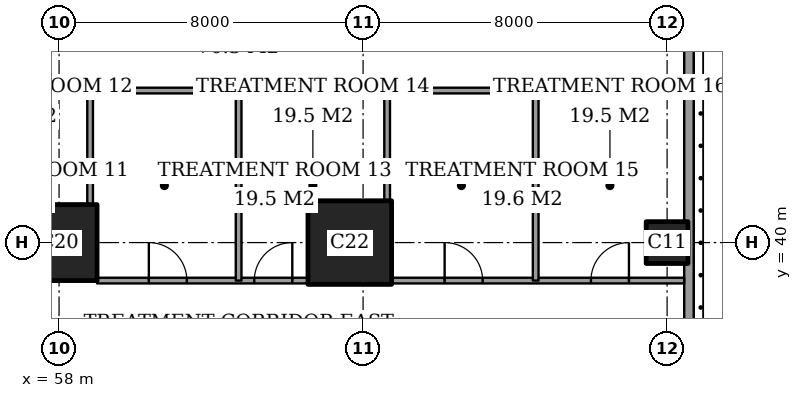
"""IFC4 building model, lengths in metres.
Left out: names, types, materials, properties, quantities, classifications, styles, units other than length and angle.
Written with IfcOpenShell. Run it as: python <this file> out.ifc"""

import sys

from ifc_helpers import new_model, si_unit, direction, frame, frame_2d, origin, origin_2d, place, context, subcontext, project, spatial, rectangle, extrude, element, fill, save


model = new_model("IFC4")
c1 = context("Model", 3, precision=1e-05, world=origin(), true_north=direction((0.0, 1.0)))
c2 = subcontext(c1, "Body", "Model", "MODEL_VIEW")
j1 = project(units=[si_unit("LENGTHUNIT", "METRE"), si_unit("PLANEANGLEUNIT", "RADIAN")], contexts=[c1])
p1 = place(None, origin())
s1 = spatial("IfcSite", under=j1, at=p1, CompositionType="ELEMENT")
p2 = place(p1, origin())
s2 = spatial("IfcBuilding", under=s1, at=p2, CompositionType="ELEMENT")
p3 = place(p2, frame((0.0, 0.0, 11.0)))
s3 = spatial("IfcBuildingStorey", under=s2, at=p3, CompositionType="ELEMENT", Elevation=11.0)
p4 = place(p3, frame((58.0, 40.0, 0.0), z_axis=(0.0, 0.0, 1.0), x_axis=(1.0, 0.0, 0.0)))
e1 = element("IfcColumn", 1, at=p4, inside=s3, PredefinedType="COLUMN", context=c2, shape_type="SweptSolid", body=[
    extrude(rectangle(XDim=2.0, YDim=2.0, at=origin_2d()), origin(), (0.0, 0.0, 1.0), 5.0),
])
p5 = place(p3, frame((65.65, 40.0, 0.0), z_axis=(0.0, 0.0, 1.0), x_axis=(1.0, 0.0, 0.0)))
e2 = element("IfcColumn", 2, at=p5, inside=s3, PredefinedType="COLUMN", context=c2, shape_type="SweptSolid", body=[
    extrude(rectangle(XDim=2.2, YDim=2.2, at=origin_2d()), origin(), (0.0, 0.0, 1.0), 5.0),
])
p6 = place(p3, frame((74.0, 40.0, 0.0), z_axis=(0.0, 0.0, 1.0), x_axis=(1.0, 0.0, 0.0)))
e3 = element("IfcColumn", 3, at=p6, inside=s3, PredefinedType="COLUMN", context=c2, shape_type="SweptSolid", body=[
    extrude(rectangle(XDim=1.1, YDim=1.1, at=origin_2d()), origin(), (0.0, 0.0, 1.0), 5.0),
])
p7 = place(p3, frame((74.575, -8.575, 0.0), z_axis=(0.0, 0.0, 1.0), x_axis=(0.0, 1.0, 0.0)))
e4 = element("IfcWall", 4, at=p7, inside=s3, PredefinedType="SOLIDWALL", context=c2, shape_type="SweptSolid", body=[
    extrude(rectangle(XDim=65.15, YDim=0.25, at=frame_2d((32.575, 0.0))), origin(), (0.0, 0.0, 1.0), 5.0),
])
p8 = place(p7, frame((12.075, 0.0, 0.0)))
e5 = element("IfcOpeningElement", 5, at=p8, cuts=e4, PredefinedType="OPENING", context=c2, shape_type="SweptSolid", body=[
    extrude(rectangle(XDim=1.0, YDim=2.4, at=frame_2d((0.5, 1.2))), frame((0.0, 0.135, 0.0), z_axis=(0.0, -1.0, 0.0), x_axis=(1.0, 0.0, 0.0)), (0.0, 0.0, 1.0), 0.27),
])
p9 = place(p7, frame((28.075, 0.0, 0.0)))
e6 = element("IfcOpeningElement", 6, at=p9, cuts=e4, PredefinedType="OPENING", context=c2, shape_type="SweptSolid", body=[
    extrude(rectangle(XDim=1.0, YDim=2.4, at=frame_2d((0.5, 1.2))), frame((0.0, 0.135, 0.0), z_axis=(0.0, -1.0, 0.0), x_axis=(1.0, 0.0, 0.0)), (0.0, 0.0, 1.0), 0.27),
])
p10 = place(p7, frame((41.275, 0.0, 0.0)))
e7 = element("IfcOpeningElement", 7, at=p10, cuts=e4, PredefinedType="OPENING", context=c2, shape_type="SweptSolid", body=[
    extrude(rectangle(XDim=1.0, YDim=2.4, at=frame_2d((0.5, 1.2))), frame((0.0, 0.135, 0.0), z_axis=(0.0, -1.0, 0.0), x_axis=(1.0, 0.0, 0.0)), (0.0, 0.0, 1.0), 0.27),
])
p11 = place(p3, frame((59.0, 39.0, 0.0), z_axis=(0.0, 0.0, 1.0), x_axis=(1.0, 0.0, 0.0)))
e8 = element("IfcWall", 8, at=p11, inside=s3, PredefinedType="PARTITIONING", context=c2, shape_type="SweptSolid", body=[
    extrude(rectangle(XDim=5.55, YDim=0.15, at=frame_2d((2.775, 0.0))), origin(), (0.0, 0.0, 1.0), 4.7),
])
p12 = place(p11, frame((1.363, 0.0, 0.0)))
e9 = element("IfcOpeningElement", 9, at=p12, cuts=e8, PredefinedType="OPENING", context=c2, shape_type="SweptSolid", body=[
    extrude(rectangle(XDim=1.0, YDim=2.1, at=frame_2d((0.5, 1.05))), frame((0.0, 0.085, 0.0), z_axis=(0.0, -1.0, 0.0), x_axis=(1.0, 0.0, 0.0)), (0.0, 0.0, 1.0), 0.17),
])
p13 = place(p11, frame((4.137, 0.0, 0.0)))
e10 = element("IfcOpeningElement", 10, at=p13, cuts=e8, PredefinedType="OPENING", context=c2, shape_type="SweptSolid", body=[
    extrude(rectangle(XDim=1.0, YDim=2.1, at=frame_2d((0.5, 1.05))), frame((0.0, 0.085, 0.0), z_axis=(0.0, -1.0, 0.0), x_axis=(1.0, 0.0, 0.0)), (0.0, 0.0, 1.0), 0.17),
])
p14 = place(p3, frame((66.75, 39.0, 0.0), z_axis=(0.0, 0.0, 1.0), x_axis=(1.0, 0.0, 0.0)))
e11 = element("IfcWall", 11, at=p14, inside=s3, PredefinedType="PARTITIONING", context=c2, shape_type="SweptSolid", body=[
    extrude(rectangle(XDim=7.7, YDim=0.15, at=frame_2d((3.85, 0.0))), origin(), (0.0, 0.0, 1.0), 4.7),
])
p15 = place(p14, frame((1.396, 0.0, 0.0)))
e12 = element("IfcOpeningElement", 12, at=p15, cuts=e11, PredefinedType="OPENING", context=c2, shape_type="SweptSolid", body=[
    extrude(rectangle(XDim=1.0, YDim=2.1, at=frame_2d((0.5, 1.05))), frame((0.0, 0.085, 0.0), z_axis=(0.0, -1.0, 0.0), x_axis=(1.0, 0.0, 0.0)), (0.0, 0.0, 1.0), 0.17),
])
p16 = place(p14, frame((5.246, 0.0, 0.0)))
e13 = element("IfcOpeningElement", 13, at=p16, cuts=e11, PredefinedType="OPENING", context=c2, shape_type="SweptSolid", body=[
    extrude(rectangle(XDim=1.0, YDim=2.1, at=frame_2d((0.5, 1.05))), frame((0.0, 0.085, 0.0), z_axis=(0.0, -1.0, 0.0), x_axis=(1.0, 0.0, 0.0)), (0.0, 0.0, 1.0), 0.17),
])
p17 = place(p3, frame((51.0, 44.0, 0.0), z_axis=(0.0, 0.0, 1.0), x_axis=(1.0, 0.0, 0.0)))
e14 = element("IfcWall", 14, at=p17, inside=s3, PredefinedType="PARTITIONING", context=c2, shape_type="SweptSolid", body=[
    extrude(rectangle(XDim=23.45, YDim=0.15, at=frame_2d((11.725, 0.0))), origin(), (0.0, 0.0, 1.0), 4.7),
])
p18 = place(p3, frame((58.817, 41.0, 0.0), z_axis=(0.0, 0.0, 1.0), x_axis=(0.0, 1.0, 0.0)))
e15 = element("IfcWall", 15, at=p18, inside=s3, PredefinedType="PARTITIONING", context=c2, shape_type="SweptSolid", body=[
    extrude(rectangle(XDim=3.0, YDim=0.15, at=frame_2d((1.5, 0.0))), origin(), (0.0, 0.0, 1.0), 4.7),
])
p19 = place(p3, frame((62.725, 39.0, 0.0), z_axis=(0.0, 0.0, 1.0), x_axis=(0.0, 1.0, 0.0)))
e16 = element("IfcWall", 16, at=p19, inside=s3, PredefinedType="PARTITIONING", context=c2, shape_type="SweptSolid", body=[
    extrude(rectangle(XDim=5.0, YDim=0.15, at=frame_2d((2.5, 0.0))), origin(), (0.0, 0.0, 1.0), 4.7),
])
p20 = place(p3, frame((66.633, 41.1, 0.0), z_axis=(0.0, 0.0, 1.0), x_axis=(0.0, 1.0, 0.0)))
e17 = element("IfcWall", 17, at=p20, inside=s3, PredefinedType="PARTITIONING", context=c2, shape_type="SweptSolid", body=[
    extrude(rectangle(XDim=2.9, YDim=0.15, at=frame_2d((1.45, 0.0))), origin(), (0.0, 0.0, 1.0), 4.7),
])
p21 = place(p3, frame((70.542, 39.0, 0.0), z_axis=(0.0, 0.0, 1.0), x_axis=(0.0, 1.0, 0.0)))
e18 = element("IfcWall", 18, at=p21, inside=s3, PredefinedType="PARTITIONING", context=c2, shape_type="SweptSolid", body=[
    extrude(rectangle(XDim=5.0, YDim=0.15, at=frame_2d((2.5, 0.0))), origin(), (0.0, 0.0, 1.0), 4.7),
])
p22 = place(p12, origin())
e19 = element("IfcDoor", 19, at=p22, inside=s3, OperationType="SINGLE_SWING_RIGHT", PredefinedType="DOOR", context=c2, shape_type="SweptSolid", body=[
    extrude(rectangle(XDim=1.0, YDim=2.1, at=frame_2d((0.5, 1.05))), frame((0.0, 0.025, 0.0), z_axis=(0.0, -1.0, 0.0), x_axis=(1.0, 0.0, 0.0)), (0.0, 0.0, 1.0), 0.05),
])
fill(e9, e19)
p23 = place(p13, origin())
e20 = element("IfcDoor", 20, at=p23, inside=s3, OperationType="SINGLE_SWING_LEFT", PredefinedType="DOOR", context=c2, shape_type="SweptSolid", body=[
    extrude(rectangle(XDim=1.0, YDim=2.1, at=frame_2d((0.5, 1.05))), frame((0.0, 0.025, 0.0), z_axis=(0.0, -1.0, 0.0), x_axis=(1.0, 0.0, 0.0)), (0.0, 0.0, 1.0), 0.05),
])
fill(e10, e20)
p24 = place(p15, origin())
e21 = element("IfcDoor", 21, at=p24, inside=s3, OperationType="SINGLE_SWING_RIGHT", PredefinedType="DOOR", context=c2, shape_type="SweptSolid", body=[
    extrude(rectangle(XDim=1.0, YDim=2.1, at=frame_2d((0.5, 1.05))), frame((0.0, 0.025, 0.0), z_axis=(0.0, -1.0, 0.0), x_axis=(1.0, 0.0, 0.0)), (0.0, 0.0, 1.0), 0.05),
])
fill(e12, e21)
p25 = place(p16, origin())
e22 = element("IfcDoor", 22, at=p25, inside=s3, OperationType="SINGLE_SWING_LEFT", PredefinedType="DOOR", context=c2, shape_type="SweptSolid", body=[
    extrude(rectangle(XDim=1.0, YDim=2.1, at=frame_2d((0.5, 1.05))), frame((0.0, 0.025, 0.0), z_axis=(0.0, -1.0, 0.0), x_axis=(1.0, 0.0, 0.0)), (0.0, 0.0, 1.0), 0.05),
])
fill(e13, e22)
save(model, sys.argv[1])
